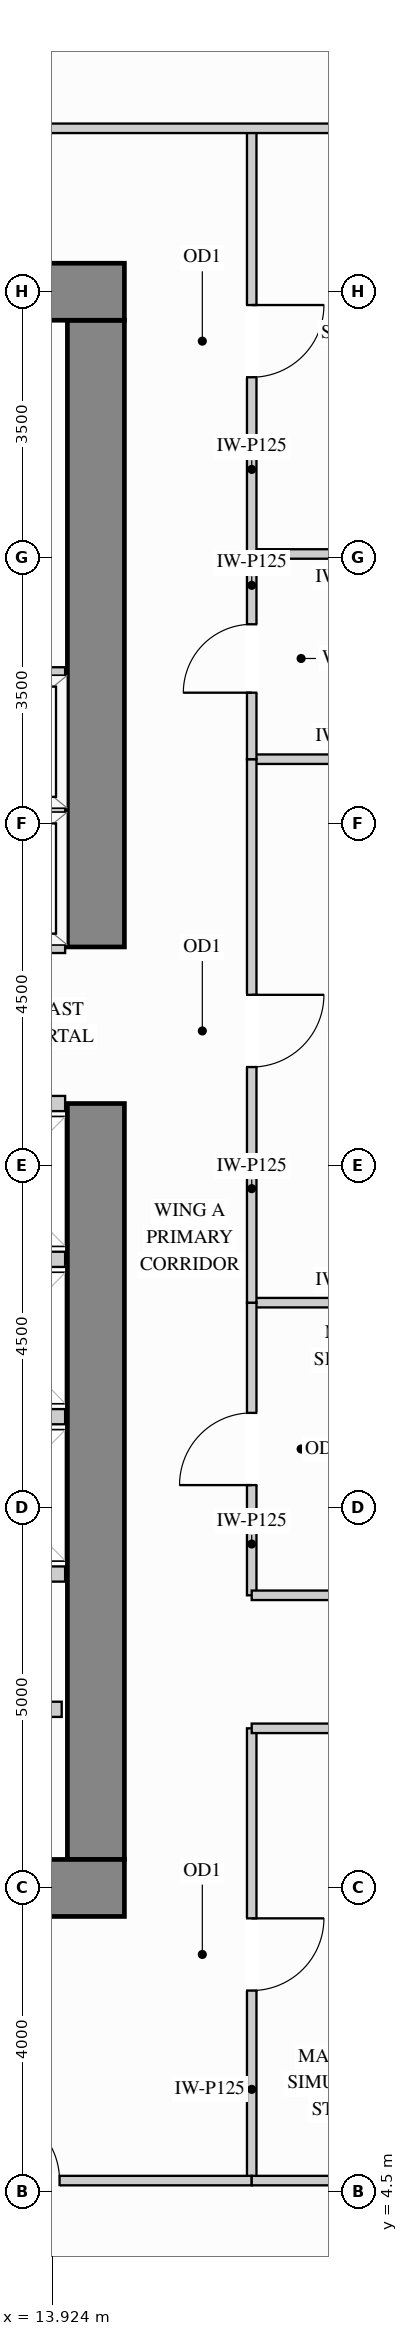
"""IFC4 building model, lengths in metres.
Left out: names, types, materials, properties, quantities, classifications, styles, units other than length and angle.
Written with IfcOpenShell. Run it as: python <this file> out.ifc"""

import sys

from ifc_helpers import new_model, si_unit, direction, frame, frame_2d, origin, place, context, subcontext, project, spatial, rectangle, extrude, source, transform, mapped, element, fill, save


model = new_model("IFC4")
c1 = context("Model", 3, precision=1e-05, world=origin(), true_north=direction((0.0, 1.0)))
c2 = subcontext(c1, "Body", "Model", "MODEL_VIEW")
j1 = project(units=[si_unit("LENGTHUNIT", "METRE"), si_unit("PLANEANGLEUNIT", "RADIAN")], contexts=[c1])
p1 = place(None, origin())
s1 = spatial("IfcSite", under=j1, at=p1, CompositionType="ELEMENT")
p2 = place(p1, origin())
s2 = spatial("IfcBuilding", under=s1, at=p2, CompositionType="ELEMENT")
p3 = place(p2, frame((0.0, 0.0, 127.8)))
s3 = spatial("IfcBuildingStorey", under=s2, at=p3, CompositionType="ELEMENT", Elevation=127.8)
m1 = source(origin(), c2, "Body", "SweptSolid", [
    extrude(rectangle(XDim=9.945, YDim=0.75, at=frame_2d((4.973, 0.0))), origin(), (0.0, 0.0, 1.0), 3.38),
])
p4 = place(p3, frame((14.5, 8.875, 0.0), z_axis=(0.0, 0.0, 1.0), x_axis=(0.0, 1.0, 0.0)))
e1 = element("IfcWall", 1, at=p4, inside=s3, PredefinedType="SHEAR", context=c2, shape_type="MappedRepresentation", body=[
    mapped(m1, transform((0.0, 0.0, 0.0), x_axis=(1.0, 0.0, 0.0), y_axis=(0.0, 1.0, 0.0), z_axis=(0.0, 0.0, 1.0))),
])
m2 = source(origin(), c2, "Body", "SweptSolid", [
    extrude(rectangle(XDim=8.245, YDim=0.75, at=frame_2d((4.123, 0.0))), origin(), (0.0, 0.0, 1.0), 3.38),
])
p5 = place(p3, frame((14.5, 20.88, 0.0), z_axis=(0.0, 0.0, 1.0), x_axis=(0.0, 1.0, 0.0)))
e2 = element("IfcWall", 2, at=p5, inside=s3, PredefinedType="SHEAR", context=c2, shape_type="MappedRepresentation", body=[
    mapped(m2, transform((0.0, 0.0, 0.0), x_axis=(1.0, 0.0, 0.0), y_axis=(0.0, 1.0, 0.0), z_axis=(0.0, 0.0, 1.0))),
])
m3 = source(origin(), c2, "Body", "SweptSolid", [
    extrude(rectangle(XDim=10.75, YDim=0.75, at=frame_2d((5.375, 0.0))), origin(), (0.0, 0.0, 1.0), 3.38),
])
for number, where, z_axis, x_axis in (
    (3, (4.125, 29.5, 0.0), (0.0, 0.0, 1.0), (1.0, 0.0, 0.0)),
    (4, (4.125, 8.5, 0.0), (0.0, 0.0, 1.0), (1.0, 0.0, 0.0)),
):
    element("IfcWall", number, at=place(p3, frame(where, z_axis=z_axis, x_axis=x_axis)), inside=s3, PredefinedType="SHEAR", context=c2, shape_type="MappedRepresentation", body=[
        mapped(m3, transform((0.0, 0.0, 0.0), x_axis=(1.0, 0.0, 0.0), y_axis=(0.0, 1.0, 0.0), z_axis=(0.0, 0.0, 1.0))),
    ])
m4 = source(origin(), c2, "Body", "SweptSolid", [
    extrude(rectangle(XDim=2.6, YDim=0.125, at=frame_2d((1.3, 0.0))), origin(), (0.0, 0.0, 1.0), 3.365),
])
p6 = place(p3, frame((16.55, 16.2, 0.0), z_axis=(0.0, 0.0, 1.0), x_axis=(1.0, 0.0, 0.0)))
e5 = element("IfcWall", 5, at=p6, inside=s3, PredefinedType="PARTITIONING", context=c2, shape_type="MappedRepresentation", body=[
    mapped(m4, transform((0.0, 0.0, 0.0), x_axis=(1.0, 0.0, 0.0), y_axis=(0.0, 1.0, 0.0), z_axis=(0.0, 0.0, 1.0))),
])
m5 = source(origin(), c2, "Body", "SweptSolid", [
    extrude(rectangle(XDim=2.598, YDim=0.125, at=frame_2d((1.299, 0.0))), origin(), (0.0, 0.0, 1.0), 3.365),
])
for number, where, z_axis, x_axis in (
    (6, (16.55, 23.35, 0.0), (0.0, 0.0, 1.0), (1.0, 0.0, 0.0)),
    (7, (16.55, 26.05, 0.0), (0.0, 0.0, 1.0), (1.0, 0.0, 0.0)),
):
    element("IfcWall", number, at=place(p3, frame(where, z_axis=z_axis, x_axis=x_axis)), inside=s3, PredefinedType="PARTITIONING", context=c2, shape_type="MappedRepresentation", body=[
        mapped(m5, transform((0.0, 0.0, 0.0), x_axis=(1.0, 0.0, 0.0), y_axis=(0.0, 1.0, 0.0), z_axis=(0.0, 0.0, 1.0))),
    ])
p7 = place(p3, frame((16.55, 12.35, 0.0), z_axis=(0.0, 0.0, 1.0), x_axis=(0.0, 1.0, 0.0)))
e8 = element("IfcWall", 8, at=p7, inside=s3, PredefinedType="PARTITIONING", context=c2, shape_type="SweptSolid", body=[
    extrude(rectangle(XDim=3.85, YDim=0.125, at=frame_2d((1.925, 0.0))), origin(), (0.0, 0.0, 1.0), 3.365),
])
p8 = place(p7, frame((1.45, 0.0, 0.0)))
e9 = element("IfcOpeningElement", 9, at=p8, cuts=e8, PredefinedType="OPENING", context=c2, shape_type="SweptSolid", body=[
    extrude(rectangle(XDim=0.95, YDim=2.15, at=frame_2d((0.475, 1.075))), frame((0.0, 0.073, 0.0), z_axis=(0.0, -1.0, 0.0), x_axis=(1.0, 0.0, 0.0)), (0.0, 0.0, 1.0), 0.145),
])
p9 = place(p3, frame((16.55, 16.2, 0.0), z_axis=(0.0, 0.0, 1.0), x_axis=(0.0, 1.0, 0.0)))
e10 = element("IfcWall", 10, at=p9, inside=s3, PredefinedType="PARTITIONING", context=c2, shape_type="SweptSolid", body=[
    extrude(rectangle(XDim=7.15, YDim=0.125, at=frame_2d((3.575, 0.0))), origin(), (0.0, 0.0, 1.0), 3.365),
])
p10 = place(p9, frame((3.1, 0.0, 0.0)))
e11 = element("IfcOpeningElement", 11, at=p10, cuts=e10, PredefinedType="OPENING", context=c2, shape_type="SweptSolid", body=[
    extrude(rectangle(XDim=0.95, YDim=2.15, at=frame_2d((0.475, 1.075))), frame((0.0, 0.073, 0.0), z_axis=(0.0, -1.0, 0.0), x_axis=(1.0, 0.0, 0.0)), (0.0, 0.0, 1.0), 0.145),
])
p11 = place(p3, frame((16.55, 26.05, 0.0), z_axis=(0.0, 0.0, 1.0), x_axis=(0.0, 1.0, 0.0)))
e12 = element("IfcWall", 12, at=p11, inside=s3, PredefinedType="PARTITIONING", context=c2, shape_type="SweptSolid", body=[
    extrude(rectangle(XDim=5.6, YDim=0.125, at=frame_2d((2.8, 0.0))), origin(), (0.0, 0.0, 1.0), 3.365),
])
p12 = place(p11, frame((2.325, 0.0, 0.0)))
e13 = element("IfcOpeningElement", 13, at=p12, cuts=e12, PredefinedType="OPENING", context=c2, shape_type="SweptSolid", body=[
    extrude(rectangle(XDim=0.95, YDim=2.15, at=frame_2d((0.475, 1.075))), frame((0.0, 0.073, 0.0), z_axis=(0.0, -1.0, 0.0), x_axis=(1.0, 0.0, 0.0)), (0.0, 0.0, 1.0), 0.145),
])
p13 = place(p3, frame((16.55, 4.65, 0.0), z_axis=(0.0, 0.0, 1.0), x_axis=(0.0, 1.0, 0.0)))
e14 = element("IfcWall", 14, at=p13, inside=s3, PredefinedType="PARTITIONING", context=c2, shape_type="SweptSolid", body=[
    extrude(rectangle(XDim=5.95, YDim=0.125, at=frame_2d((2.975, 0.0))), origin(), (0.0, 0.0, 1.0), 3.365),
])
p14 = place(p13, frame((2.5, 0.0, 0.0)))
e15 = element("IfcOpeningElement", 15, at=p14, cuts=e14, PredefinedType="OPENING", context=c2, shape_type="SweptSolid", body=[
    extrude(rectangle(XDim=0.95, YDim=2.15, at=frame_2d((0.475, 1.075))), frame((0.0, 0.073, 0.0), z_axis=(0.0, -1.0, 0.0), x_axis=(1.0, 0.0, 0.0)), (0.0, 0.0, 1.0), 0.145),
])
p15 = place(p3, frame((16.55, 23.35, 0.0), z_axis=(0.0, 0.0, 1.0), x_axis=(0.0, 1.0, 0.0)))
e16 = element("IfcWall", 16, at=p15, inside=s3, PredefinedType="PARTITIONING", context=c2, shape_type="SweptSolid", body=[
    extrude(rectangle(XDim=2.7, YDim=0.125, at=frame_2d((1.35, 0.0))), origin(), (0.0, 0.0, 1.0), 3.365),
])
p16 = place(p15, frame((0.875, 0.0, 0.0)))
e17 = element("IfcOpeningElement", 17, at=p16, cuts=e16, PredefinedType="OPENING", context=c2, shape_type="SweptSolid", body=[
    extrude(rectangle(XDim=0.9, YDim=2.15, at=frame_2d((0.45, 1.075))), frame((0.0, 0.073, 0.0), z_axis=(0.0, -1.0, 0.0), x_axis=(1.0, 0.0, 0.0)), (0.0, 0.0, 1.0), 0.145),
])
m6 = source(origin(), c2, "Body", "SweptSolid", [
    extrude(rectangle(XDim=7.498, YDim=0.125, at=frame_2d((3.749, 0.0))), origin(), (0.0, 0.0, 1.0), 2.828),
])
p17 = place(p3, frame((11.65, 31.65, 0.0), z_axis=(0.0, 0.0, 1.0), x_axis=(1.0, 0.0, 0.0)))
e18 = element("IfcWall", 18, at=p17, inside=s3, PredefinedType="PARTITIONING", context=c2, shape_type="MappedRepresentation", body=[
    mapped(m6, transform((0.0, 0.0, 0.0), x_axis=(1.0, 0.0, 0.0), y_axis=(0.0, 1.0, 0.0), z_axis=(0.0, 0.0, 1.0))),
])
m7 = source(origin(), c2, "Body", "SweptSolid", [
    extrude(rectangle(XDim=2.95, YDim=0.125, at=frame_2d((1.475, 0.0))), origin(), (0.0, 0.0, 1.0), 3.365),
])
for number, where, z_axis, x_axis in (
    (19, (16.55, 12.35, 0.0), (0.0, 0.0, 1.0), (1.0, 0.0, 0.0)),
    (20, (16.55, 10.6, 0.0), (0.0, 0.0, 1.0), (1.0, 0.0, 0.0)),
):
    element("IfcWall", number, at=place(p3, frame(where, z_axis=z_axis, x_axis=x_axis)), inside=s3, PredefinedType="PARTITIONING", context=c2, shape_type="MappedRepresentation", body=[
        mapped(m7, transform((0.0, 0.0, 0.0), x_axis=(1.0, 0.0, 0.0), y_axis=(0.0, 1.0, 0.0), z_axis=(0.0, 0.0, 1.0))),
    ])
p18 = place(p3, frame((10.544, 4.65, 0.0), z_axis=(0.0, 0.0, 1.0), x_axis=(1.0, 0.0, 0.0)))
e21 = element("IfcWall", 21, at=p18, inside=s3, PredefinedType="PARTITIONING", context=c2, shape_type="SweptSolid", body=[
    extrude(rectangle(XDim=6.006, YDim=0.125, at=frame_2d((3.003, 0.0))), origin(), (0.0, 0.0, 1.0), 2.828),
])
p19 = place(p18, frame((2.528, 0.0, 0.0)))
e22 = element("IfcOpeningElement", 22, at=p19, cuts=e21, PredefinedType="OPENING", context=c2, shape_type="SweptSolid", body=[
    extrude(rectangle(XDim=0.95, YDim=2.15, at=frame_2d((0.475, 1.075))), frame((0.0, 0.073, 0.0), z_axis=(0.0, -1.0, 0.0), x_axis=(1.0, 0.0, 0.0)), (0.0, 0.0, 1.0), 0.145),
])
m8 = source(origin(), c2, "Body", "SweptSolid", [
    extrude(rectangle(XDim=2.598, YDim=0.125, at=frame_2d((1.299, 0.0))), origin(), (0.0, 0.0, 1.0), 2.828),
])
p20 = place(p3, frame((16.55, 4.65, 0.0), z_axis=(0.0, 0.0, 1.0), x_axis=(1.0, 0.0, 0.0)))
e23 = element("IfcWall", 23, at=p20, inside=s3, PredefinedType="PARTITIONING", context=c2, shape_type="MappedRepresentation", body=[
    mapped(m8, transform((0.0, 0.0, 0.0), x_axis=(1.0, 0.0, 0.0), y_axis=(0.0, 1.0, 0.0), z_axis=(0.0, 0.0, 1.0))),
])
m9 = source(origin(), c2, "Body", "SweptSolid", [
    extrude(rectangle(XDim=1.63, YDim=0.2, at=frame_2d((0.815, 0.0))), origin(), (0.0, 0.0, 1.0), 3.365),
])
p21 = place(p3, frame((12.42, 10.85, 0.0), z_axis=(0.0, 0.0, 1.0), x_axis=(1.0, 0.0, 0.0)))
e24 = element("IfcWall", 24, at=p21, inside=s3, PredefinedType="PARTITIONING", context=c2, shape_type="MappedRepresentation", body=[
    mapped(m9, transform((0.0, 0.0, 0.0), x_axis=(1.0, 0.0, 0.0), y_axis=(0.0, 1.0, 0.0), z_axis=(0.0, 0.0, 1.0))),
])
m10 = source(origin(), c2, "Body", "SweptSolid", [
    extrude(rectangle(XDim=2.265, YDim=0.2, at=frame_2d((1.132, 0.0))), origin(), (0.0, 0.0, 1.0), 3.365),
])
for number, where, z_axis, x_axis in (
    (25, (11.83, 22.66, 0.0), (0.0, 0.0, 1.0), (1.0, 0.0, 0.0)),
    (26, (11.83, 20.9, 0.0), (0.0, 0.0, 1.0), (1.0, 0.0, 0.0)),
    (27, (11.83, 24.46, 0.0), (0.0, 0.0, 1.0), (1.0, 0.0, 0.0)),
):
    element("IfcWall", number, at=place(p3, frame(where, z_axis=z_axis, x_axis=x_axis)), inside=s3, PredefinedType="PARTITIONING", context=c2, shape_type="MappedRepresentation", body=[
        mapped(m10, transform((0.0, 0.0, 0.0), x_axis=(1.0, 0.0, 0.0), y_axis=(0.0, 1.0, 0.0), z_axis=(0.0, 0.0, 1.0))),
    ])
m11 = source(origin(), c2, "Body", "SweptSolid", [
    extrude(rectangle(XDim=1.865, YDim=0.2, at=frame_2d((0.933, 0.0))), origin(), (0.0, 0.0, 1.0), 3.365),
])
for number, where, z_axis, x_axis in (
    (28, (12.23, 14.7, 0.0), (0.0, 0.0, 1.0), (1.0, 0.0, 0.0)),
    (29, (12.23, 12.63, 0.0), (0.0, 0.0, 1.0), (1.0, 0.0, 0.0)),
    (30, (12.23, 16.77, 0.0), (0.0, 0.0, 1.0), (1.0, 0.0, 0.0)),
    (31, (12.23, 18.82, 0.0), (0.0, 0.0, 1.0), (1.0, 0.0, 0.0)),
):
    element("IfcWall", number, at=place(p3, frame(where, z_axis=z_axis, x_axis=x_axis)), inside=s3, PredefinedType="PARTITIONING", context=c2, shape_type="MappedRepresentation", body=[
        mapped(m11, transform((0.0, 0.0, 0.0), x_axis=(1.0, 0.0, 0.0), y_axis=(0.0, 1.0, 0.0), z_axis=(0.0, 0.0, 1.0))),
    ])
m12 = source(origin(), c2, "Body", "SweptSolid", [
    extrude(rectangle(XDim=0.95, YDim=2.15, at=frame_2d((0.475, 1.075))), frame((0.0, 0.025, 0.0), z_axis=(0.0, -1.0, 0.0), x_axis=(1.0, 0.0, 0.0)), (0.0, 0.0, 1.0), 0.05),
])
p22 = place(p14, origin())
e32 = element("IfcDoor", 32, at=p22, inside=s3, OperationType="SINGLE_SWING_RIGHT", PredefinedType="DOOR", context=c2, shape_type="MappedRepresentation", body=[
    mapped(m12, transform((0.0, 0.0, 0.0), x_axis=(1.0, 0.0, 0.0), y_axis=(0.0, 1.0, 0.0), z_axis=(0.0, 0.0, 1.0))),
])
fill(e15, e32)
p23 = place(p8, origin())
e33 = element("IfcDoor", 33, at=p23, inside=s3, OperationType="SINGLE_SWING_LEFT", PredefinedType="DOOR", context=c2, shape_type="MappedRepresentation", body=[
    mapped(m12, transform((0.0, 0.0, 0.0), x_axis=(1.0, 0.0, 0.0), y_axis=(0.0, 1.0, 0.0), z_axis=(0.0, 0.0, 1.0))),
])
fill(e9, e33)
p24 = place(p10, origin())
e34 = element("IfcDoor", 34, at=p24, inside=s3, OperationType="SINGLE_SWING_RIGHT", PredefinedType="DOOR", context=c2, shape_type="MappedRepresentation", body=[
    mapped(m12, transform((0.0, 0.0, 0.0), x_axis=(1.0, 0.0, 0.0), y_axis=(0.0, 1.0, 0.0), z_axis=(0.0, 0.0, 1.0))),
])
fill(e11, e34)
p25 = place(p12, origin())
e35 = element("IfcDoor", 35, at=p25, inside=s3, OperationType="SINGLE_SWING_RIGHT", PredefinedType="DOOR", context=c2, shape_type="MappedRepresentation", body=[
    mapped(m12, transform((0.0, 0.0, 0.0), x_axis=(1.0, 0.0, 0.0), y_axis=(0.0, 1.0, 0.0), z_axis=(0.0, 0.0, 1.0))),
])
fill(e13, e35)
p26 = place(p19, origin())
e36 = element("IfcDoor", 36, at=p26, inside=s3, OperationType="SINGLE_SWING_LEFT", PredefinedType="DOOR", context=c2, shape_type="MappedRepresentation", body=[
    mapped(m12, transform((0.0, 0.0, 0.0), x_axis=(1.0, 0.0, 0.0), y_axis=(0.0, 1.0, 0.0), z_axis=(0.0, 0.0, 1.0))),
])
fill(e22, e36)
m13 = source(origin(), c2, "Body", "SweptSolid", [
    extrude(rectangle(XDim=0.9, YDim=2.15, at=frame_2d((0.45, 1.075))), frame((0.0, 0.025, 0.0), z_axis=(0.0, -1.0, 0.0), x_axis=(1.0, 0.0, 0.0)), (0.0, 0.0, 1.0), 0.05),
])
p27 = place(p16, origin())
e37 = element("IfcDoor", 37, at=p27, inside=s3, OperationType="SINGLE_SWING_LEFT", PredefinedType="DOOR", context=c2, shape_type="MappedRepresentation", body=[
    mapped(m13, transform((0.0, 0.0, 0.0), x_axis=(1.0, 0.0, 0.0), y_axis=(0.0, 1.0, 0.0), z_axis=(0.0, 0.0, 1.0))),
])
fill(e17, e37)
save(model, sys.argv[1])
